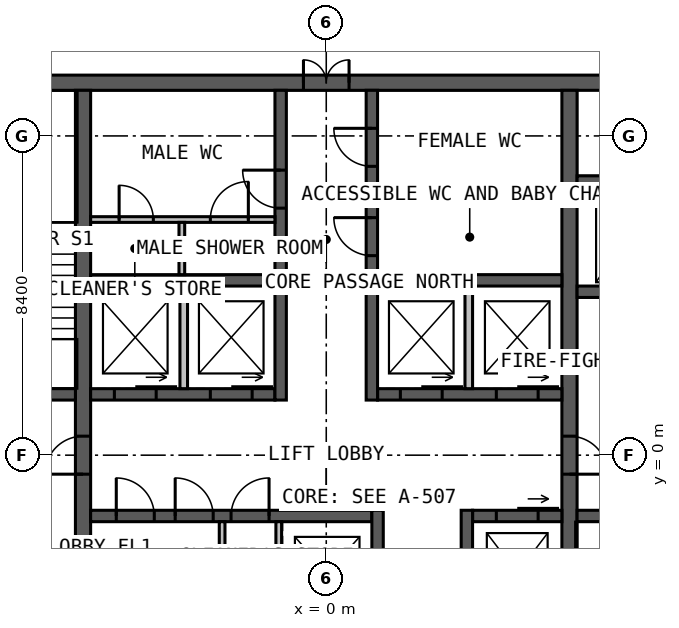
"""IFC4 building model, lengths in metres.
Left out: names, types, materials, properties, quantities, classifications, styles, units other than length and angle.
Written with IfcOpenShell. Run it as: python <this file> out.ifc"""

import sys

from ifc_helpers import new_model, si_unit, direction, frame, frame_2d, origin, place, context, subcontext, project, spatial, rectangle, extrude, element, fill, save


model = new_model("IFC4")
c1 = context("Model", 3, precision=1e-05, world=origin(), true_north=direction((0.0, 1.0)))
c2 = subcontext(c1, "Body", "Model", "MODEL_VIEW")
j1 = project(units=[si_unit("LENGTHUNIT", "METRE"), si_unit("PLANEANGLEUNIT", "RADIAN")], contexts=[c1])
p1 = place(None, origin())
s1 = spatial("IfcSite", under=j1, at=p1, CompositionType="ELEMENT")
p2 = place(p1, origin())
s2 = spatial("IfcBuilding", under=s1, at=p2, CompositionType="ELEMENT")
p3 = place(p2, frame((0.0, 0.0, 264.0)))
s3 = spatial("IfcBuildingStorey", under=s2, at=p3, CompositionType="ELEMENT", Elevation=264.0)
p4 = place(p3, frame((-10.0, 9.8, 0.0), z_axis=(0.0, 0.0, 1.0), x_axis=(1.0, 0.0, 0.0)))
e1 = element("IfcWall", 1, at=p4, inside=s3, PredefinedType="SOLIDWALL", context=c2, shape_type="SweptSolid", body=[
    extrude(rectangle(XDim=20.0, YDim=0.4, at=frame_2d((10.0, 0.0))), origin(), (0.0, 0.0, 1.0), 4.0),
])
p5 = place(p4, frame((9.4, 0.0, 0.0)))
e2 = element("IfcOpeningElement", 2, at=p5, cuts=e1, PredefinedType="OPENING", context=c2, shape_type="SweptSolid", body=[
    extrude(rectangle(XDim=1.2, YDim=2.2, at=frame_2d((0.6, 1.1))), frame((0.0, 0.21, 0.0), z_axis=(0.0, -1.0, 0.0), x_axis=(1.0, 0.0, 0.0)), (0.0, 0.0, 1.0), 0.42),
])
p6 = place(p3, frame((-6.4, -9.6, 0.0), z_axis=(0.0, 0.0, 1.0), x_axis=(0.0, 1.0, 0.0)))
e3 = element("IfcWall", 3, at=p6, inside=s3, PredefinedType="SOLIDWALL", context=c2, shape_type="SweptSolid", body=[
    extrude(rectangle(XDim=19.2, YDim=0.4, at=frame_2d((9.6, 0.0))), origin(), (0.0, 0.0, 1.0), 4.0),
])
p7 = place(p6, frame((9.1, 0.0, 0.0)))
e4 = element("IfcOpeningElement", 4, at=p7, cuts=e3, PredefinedType="OPENING", context=c2, shape_type="SweptSolid", body=[
    extrude(rectangle(XDim=1.0, YDim=2.2, at=frame_2d((0.5, 1.1))), frame((0.0, 0.21, 0.0), z_axis=(0.0, -1.0, 0.0), x_axis=(1.0, 0.0, 0.0)), (0.0, 0.0, 1.0), 0.42),
])
p8 = place(p3, frame((6.4, 9.6, 0.0), z_axis=(0.0, 0.0, 1.0), x_axis=(0.0, -1.0, 0.0)))
e5 = element("IfcWall", 5, at=p8, inside=s3, PredefinedType="SOLIDWALL", context=c2, shape_type="SweptSolid", body=[
    extrude(rectangle(XDim=19.2, YDim=0.4, at=frame_2d((9.6, 0.0))), origin(), (0.0, 0.0, 1.0), 4.0),
])
p9 = place(p8, frame((9.1, 0.0, 0.0)))
e6 = element("IfcOpeningElement", 6, at=p9, cuts=e5, PredefinedType="OPENING", context=c2, shape_type="SweptSolid", body=[
    extrude(rectangle(XDim=1.0, YDim=2.2, at=frame_2d((0.5, 1.1))), frame((0.0, 0.21, 0.0), z_axis=(0.0, -1.0, 0.0), x_axis=(1.0, 0.0, 0.0)), (0.0, 0.0, 1.0), 0.42),
])
p10 = place(p3, frame((-6.2, 1.6, 0.0), z_axis=(0.0, 0.0, 1.0), x_axis=(1.0, 0.0, 0.0)))
e7 = element("IfcWall", 7, at=p10, inside=s3, PredefinedType="SOLIDWALL", context=c2, shape_type="SweptSolid", body=[
    extrude(rectangle(XDim=4.85, YDim=0.3, at=frame_2d((2.425, 0.0))), origin(), (0.0, 0.0, 1.0), 4.0),
])
p11 = place(p10, frame((0.625, 0.0, 0.0)))
e8 = element("IfcOpeningElement", 8, at=p11, cuts=e7, PredefinedType="OPENING", context=c2, shape_type="SweptSolid", body=[
    extrude(rectangle(XDim=1.1, YDim=2.2, at=frame_2d((0.55, 1.1))), frame((0.0, 0.16, 0.0), z_axis=(0.0, -1.0, 0.0), x_axis=(1.0, 0.0, 0.0)), (0.0, 0.0, 1.0), 0.32),
])
p12 = place(p10, frame((3.15, 0.0, 0.0)))
e9 = element("IfcOpeningElement", 9, at=p12, cuts=e7, PredefinedType="OPENING", context=c2, shape_type="SweptSolid", body=[
    extrude(rectangle(XDim=1.1, YDim=2.2, at=frame_2d((0.55, 1.1))), frame((0.0, 0.16, 0.0), z_axis=(0.0, -1.0, 0.0), x_axis=(1.0, 0.0, 0.0)), (0.0, 0.0, 1.0), 0.32),
])
p13 = place(p3, frame((1.35, 1.6, 0.0), z_axis=(0.0, 0.0, 1.0), x_axis=(1.0, 0.0, 0.0)))
e10 = element("IfcWall", 10, at=p13, inside=s3, PredefinedType="SOLIDWALL", context=c2, shape_type="SweptSolid", body=[
    extrude(rectangle(XDim=4.85, YDim=0.3, at=frame_2d((2.425, 0.0))), origin(), (0.0, 0.0, 1.0), 4.0),
])
p14 = place(p13, frame((0.6, 0.0, 0.0)))
e11 = element("IfcOpeningElement", 11, at=p14, cuts=e10, PredefinedType="OPENING", context=c2, shape_type="SweptSolid", body=[
    extrude(rectangle(XDim=1.1, YDim=2.2, at=frame_2d((0.55, 1.1))), frame((0.0, 0.16, 0.0), z_axis=(0.0, -1.0, 0.0), x_axis=(1.0, 0.0, 0.0)), (0.0, 0.0, 1.0), 0.32),
])
p15 = place(p13, frame((3.125, 0.0, 0.0)))
e12 = element("IfcOpeningElement", 12, at=p15, cuts=e10, PredefinedType="OPENING", context=c2, shape_type="SweptSolid", body=[
    extrude(rectangle(XDim=1.1, YDim=2.2, at=frame_2d((0.55, 1.1))), frame((0.0, 0.16, 0.0), z_axis=(0.0, -1.0, 0.0), x_axis=(1.0, 0.0, 0.0)), (0.0, 0.0, 1.0), 0.32),
])
for number, where, z_axis, x_axis in (
    (13, (-6.2, 4.6, 0.0), (0.0, 0.0, 1.0), (1.0, 0.0, 0.0)),
    (14, (1.35, 4.6, 0.0), (0.0, 0.0, 1.0), (1.0, 0.0, 0.0)),
):
    element("IfcWall", number, at=place(p3, frame(where, z_axis=z_axis, x_axis=x_axis)), inside=s3, PredefinedType="SOLIDWALL", context=c2, shape_type="SweptSolid", body=[
        extrude(rectangle(XDim=4.85, YDim=0.3, at=frame_2d((2.425, 0.0))), origin(), (0.0, 0.0, 1.0), 4.0),
    ])
p16 = place(p3, frame((-1.2, 1.45, 0.0), z_axis=(0.0, 0.0, 1.0), x_axis=(0.0, 1.0, 0.0)))
e15 = element("IfcWall", 15, at=p16, inside=s3, PredefinedType="SOLIDWALL", context=c2, shape_type="SweptSolid", body=[
    extrude(rectangle(XDim=8.15, YDim=0.3, at=frame_2d((4.075, 0.0))), origin(), (0.0, 0.0, 1.0), 4.0),
])
p17 = place(p16, frame((5.05, 0.0, 0.0)))
e16 = element("IfcOpeningElement", 16, at=p17, cuts=e15, PredefinedType="OPENING", context=c2, shape_type="SweptSolid", body=[
    extrude(rectangle(XDim=1.0, YDim=2.2, at=frame_2d((0.5, 1.1))), frame((0.0, 0.16, 0.0), z_axis=(0.0, -1.0, 0.0), x_axis=(1.0, 0.0, 0.0)), (0.0, 0.0, 1.0), 0.32),
])
p18 = place(p3, frame((1.2, 1.45, 0.0), z_axis=(0.0, 0.0, 1.0), x_axis=(0.0, 1.0, 0.0)))
e17 = element("IfcWall", 17, at=p18, inside=s3, PredefinedType="SOLIDWALL", context=c2, shape_type="SweptSolid", body=[
    extrude(rectangle(XDim=8.15, YDim=0.3, at=frame_2d((4.075, 0.0))), origin(), (0.0, 0.0, 1.0), 4.0),
])
p19 = place(p18, frame((3.8, 0.0, 0.0)))
e18 = element("IfcOpeningElement", 18, at=p19, cuts=e17, PredefinedType="OPENING", context=c2, shape_type="SweptSolid", body=[
    extrude(rectangle(XDim=1.0, YDim=2.2, at=frame_2d((0.5, 1.1))), frame((0.0, 0.16, 0.0), z_axis=(0.0, -1.0, 0.0), x_axis=(1.0, 0.0, 0.0)), (0.0, 0.0, 1.0), 0.32),
])
p20 = place(p18, frame((6.15, 0.0, 0.0)))
e19 = element("IfcOpeningElement", 19, at=p20, cuts=e17, PredefinedType="OPENING", context=c2, shape_type="SweptSolid", body=[
    extrude(rectangle(XDim=1.0, YDim=2.2, at=frame_2d((0.5, 1.1))), frame((0.0, 0.16, 0.0), z_axis=(0.0, -1.0, 0.0), x_axis=(1.0, 0.0, 0.0)), (0.0, 0.0, 1.0), 0.32),
])
p21 = place(p3, frame((-6.2, -1.6, 0.0), z_axis=(0.0, 0.0, 1.0), x_axis=(1.0, 0.0, 0.0)))
e20 = element("IfcWall", 20, at=p21, inside=s3, PredefinedType="SOLIDWALL", context=c2, shape_type="SweptSolid", body=[
    extrude(rectangle(XDim=7.4, YDim=0.3, at=frame_2d((3.7, 0.0))), origin(), (0.0, 0.0, 1.0), 4.0),
])
p22 = place(p21, frame((0.675, 0.0, 0.0)))
e21 = element("IfcOpeningElement", 21, at=p22, cuts=e20, PredefinedType="OPENING", context=c2, shape_type="SweptSolid", body=[
    extrude(rectangle(XDim=1.0, YDim=2.2, at=frame_2d((0.5, 1.1))), frame((0.0, 0.16, 0.0), z_axis=(0.0, -1.0, 0.0), x_axis=(1.0, 0.0, 0.0)), (0.0, 0.0, 1.0), 0.32),
])
p23 = place(p21, frame((2.225, 0.0, 0.0)))
e22 = element("IfcOpeningElement", 22, at=p23, cuts=e20, PredefinedType="OPENING", context=c2, shape_type="SweptSolid", body=[
    extrude(rectangle(XDim=1.0, YDim=2.2, at=frame_2d((0.5, 1.1))), frame((0.0, 0.16, 0.0), z_axis=(0.0, -1.0, 0.0), x_axis=(1.0, 0.0, 0.0)), (0.0, 0.0, 1.0), 0.32),
])
p24 = place(p21, frame((3.695, 0.0, 0.0)))
e23 = element("IfcOpeningElement", 23, at=p24, cuts=e20, PredefinedType="OPENING", context=c2, shape_type="SweptSolid", body=[
    extrude(rectangle(XDim=1.0, YDim=2.2, at=frame_2d((0.5, 1.1))), frame((0.0, 0.16, 0.0), z_axis=(0.0, -1.0, 0.0), x_axis=(1.0, 0.0, 0.0)), (0.0, 0.0, 1.0), 0.32),
])
p25 = place(p3, frame((3.85, -1.6, 0.0), z_axis=(0.0, 0.0, 1.0), x_axis=(1.0, 0.0, 0.0)))
e24 = element("IfcWall", 24, at=p25, inside=s3, PredefinedType="SOLIDWALL", context=c2, shape_type="SweptSolid", body=[
    extrude(rectangle(XDim=2.35, YDim=0.3, at=frame_2d((1.175, 0.0))), origin(), (0.0, 0.0, 1.0), 4.0),
])
p26 = place(p25, frame((0.625, 0.0, 0.0)))
e25 = element("IfcOpeningElement", 25, at=p26, cuts=e24, PredefinedType="OPENING", context=c2, shape_type="SweptSolid", body=[
    extrude(rectangle(XDim=1.1, YDim=2.2, at=frame_2d((0.55, 1.1))), frame((0.0, 0.16, 0.0), z_axis=(0.0, -1.0, 0.0), x_axis=(1.0, 0.0, 0.0)), (0.0, 0.0, 1.0), 0.32),
])
p27 = place(p3, frame((1.35, -1.45, 0.0), z_axis=(0.0, 0.0, 1.0), x_axis=(0.0, -1.0, 0.0)))
e26 = element("IfcWall", 26, at=p27, inside=s3, PredefinedType="SOLIDWALL", context=c2, shape_type="SweptSolid", body=[
    extrude(rectangle(XDim=8.15, YDim=0.3, at=frame_2d((4.075, 0.0))), origin(), (0.0, 0.0, 1.0), 4.0),
])
p28 = place(p27, frame((6.0, 0.0, 0.0)))
e27 = element("IfcOpeningElement", 27, at=p28, cuts=e26, PredefinedType="OPENING", context=c2, shape_type="SweptSolid", body=[
    extrude(rectangle(XDim=1.0, YDim=2.2, at=frame_2d((0.5, 1.1))), frame((0.0, 0.16, 0.0), z_axis=(0.0, -1.0, 0.0), x_axis=(1.0, 0.0, 0.0)), (0.0, 0.0, 1.0), 0.32),
])
p29 = place(p27, frame((3.525, 0.0, 0.0)))
e28 = element("IfcOpeningElement", 28, at=p29, cuts=e26, PredefinedType="OPENING", context=c2, shape_type="SweptSolid", body=[
    extrude(rectangle(XDim=0.9, YDim=2.2, at=frame_2d((0.45, 1.1))), frame((0.0, 0.16, 0.0), z_axis=(0.0, -1.0, 0.0), x_axis=(1.0, 0.0, 0.0)), (0.0, 0.0, 1.0), 0.32),
])
p30 = place(p3, frame((3.7, -1.45, 0.0), z_axis=(0.0, 0.0, 1.0), x_axis=(0.0, -1.0, 0.0)))
e29 = element("IfcWall", 29, at=p30, inside=s3, PredefinedType="SOLIDWALL", context=c2, shape_type="SweptSolid", body=[
    extrude(rectangle(XDim=8.15, YDim=0.3, at=frame_2d((4.075, 0.0))), origin(), (0.0, 0.0, 1.0), 4.0),
])
p31 = place(p30, frame((5.1, 0.0, 0.0)))
e30 = element("IfcOpeningElement", 30, at=p31, cuts=e29, PredefinedType="OPENING", context=c2, shape_type="SweptSolid", body=[
    extrude(rectangle(XDim=0.9, YDim=2.2, at=frame_2d((0.45, 1.1))), frame((0.0, 0.16, 0.0), z_axis=(0.0, -1.0, 0.0), x_axis=(1.0, 0.0, 0.0)), (0.0, 0.0, 1.0), 0.32),
])
p32 = place(p3, frame((-9.6, 1.6, 0.0), z_axis=(0.0, 0.0, 1.0), x_axis=(1.0, 0.0, 0.0)))
e31 = element("IfcWall", 31, at=p32, inside=s3, PredefinedType="SOLIDWALL", context=c2, shape_type="SweptSolid", body=[
    extrude(rectangle(XDim=3.0, YDim=0.3, at=frame_2d((1.5, 0.0))), origin(), (0.0, 0.0, 1.0), 4.0),
])
p33 = place(p32, frame((1.0, 0.0, 0.0)))
e32 = element("IfcOpeningElement", 32, at=p33, cuts=e31, PredefinedType="OPENING", context=c2, shape_type="SweptSolid", body=[
    extrude(rectangle(XDim=1.0, YDim=2.2, at=frame_2d((0.5, 1.1))), frame((0.0, 0.16, 0.0), z_axis=(0.0, -1.0, 0.0), x_axis=(1.0, 0.0, 0.0)), (0.0, 0.0, 1.0), 0.32),
])
p34 = place(p3, frame((6.6, -1.6, 0.0), z_axis=(0.0, 0.0, 1.0), x_axis=(1.0, 0.0, 0.0)))
e33 = element("IfcWall", 33, at=p34, inside=s3, PredefinedType="SOLIDWALL", context=c2, shape_type="SweptSolid", body=[
    extrude(rectangle(XDim=3.0, YDim=0.3, at=frame_2d((1.5, 0.0))), origin(), (0.0, 0.0, 1.0), 4.0),
])
p35 = place(p34, frame((1.0, 0.0, 0.0)))
e34 = element("IfcOpeningElement", 34, at=p35, cuts=e33, PredefinedType="OPENING", context=c2, shape_type="SweptSolid", body=[
    extrude(rectangle(XDim=1.0, YDim=2.2, at=frame_2d((0.5, 1.1))), frame((0.0, 0.16, 0.0), z_axis=(0.0, -1.0, 0.0), x_axis=(1.0, 0.0, 0.0)), (0.0, 0.0, 1.0), 0.32),
])
p36 = place(p3, frame((6.6, 4.3, 0.0), z_axis=(0.0, 0.0, 1.0), x_axis=(1.0, 0.0, 0.0)))
e35 = element("IfcWall", 35, at=p36, inside=s3, PredefinedType="SOLIDWALL", context=c2, shape_type="SweptSolid", body=[
    extrude(rectangle(XDim=3.0, YDim=0.3, at=frame_2d((1.5, 0.0))), origin(), (0.0, 0.0, 1.0), 4.0),
])
p37 = place(p36, frame((0.75, 0.0, 0.0)))
e36 = element("IfcOpeningElement", 36, at=p37, cuts=e35, PredefinedType="OPENING", context=c2, shape_type="SweptSolid", body=[
    extrude(rectangle(XDim=1.1, YDim=2.2, at=frame_2d((0.55, 1.1))), frame((0.0, 0.16, 0.0), z_axis=(0.0, -1.0, 0.0), x_axis=(1.0, 0.0, 0.0)), (0.0, 0.0, 1.0), 0.32),
])
p38 = place(p3, frame((6.6, 7.2, 0.0), z_axis=(0.0, 0.0, 1.0), x_axis=(1.0, 0.0, 0.0)))
e37 = element("IfcWall", 37, at=p38, inside=s3, PredefinedType="SOLIDWALL", context=c2, shape_type="SweptSolid", body=[
    extrude(rectangle(XDim=3.0, YDim=0.3, at=frame_2d((1.5, 0.0))), origin(), (0.0, 0.0, 1.0), 4.0),
])
for number, where, z_axis, x_axis in (
    (38, (-3.75, 1.75, 0.0), (0.0, 0.0, 1.0), (0.0, 1.0, 0.0)),
    (39, (3.75, 1.75, 0.0), (0.0, 0.0, 1.0), (0.0, 1.0, 0.0)),
):
    element("IfcWall", number, at=place(p3, frame(where, z_axis=z_axis, x_axis=x_axis)), inside=s3, PredefinedType="SOLIDWALL", context=c2, shape_type="SweptSolid", body=[
        extrude(rectangle(XDim=2.7, YDim=0.2, at=frame_2d((1.35, 0.0))), origin(), (0.0, 0.0, 1.0), 3.75),
    ])
p39 = place(p3, frame((1.35, 6.8, 0.0), z_axis=(0.0, 0.0, 1.0), x_axis=(1.0, 0.0, 0.0)))
e40 = element("IfcWall", 40, at=p39, inside=s3, PredefinedType="PARTITIONING", context=c2, shape_type="SweptSolid", body=[
    extrude(rectangle(XDim=4.85, YDim=0.15, at=frame_2d((2.425, 0.0))), origin(), (0.0, 0.0, 1.0), 3.75),
])
p40 = place(p3, frame((-6.2, 6.2, 0.0), z_axis=(0.0, 0.0, 1.0), x_axis=(1.0, 0.0, 0.0)))
e41 = element("IfcWall", 41, at=p40, inside=s3, PredefinedType="PARTITIONING", context=c2, shape_type="SweptSolid", body=[
    extrude(rectangle(XDim=4.85, YDim=0.15, at=frame_2d((2.425, 0.0))), origin(), (0.0, 0.0, 1.0), 3.75),
])
p41 = place(p40, frame((3.15, 0.0, 0.0)))
e42 = element("IfcOpeningElement", 42, at=p41, cuts=e41, PredefinedType="OPENING", context=c2, shape_type="SweptSolid", body=[
    extrude(rectangle(XDim=1.0, YDim=2.2, at=frame_2d((0.5, 1.1))), frame((0.0, 0.085, 0.0), z_axis=(0.0, -1.0, 0.0), x_axis=(1.0, 0.0, 0.0)), (0.0, 0.0, 1.0), 0.17),
])
p42 = place(p40, frame((0.75, 0.0, 0.0)))
e43 = element("IfcOpeningElement", 43, at=p42, cuts=e41, PredefinedType="OPENING", context=c2, shape_type="SweptSolid", body=[
    extrude(rectangle(XDim=0.9, YDim=2.2, at=frame_2d((0.45, 1.1))), frame((0.0, 0.085, 0.0), z_axis=(0.0, -1.0, 0.0), x_axis=(1.0, 0.0, 0.0)), (0.0, 0.0, 1.0), 0.17),
])
p43 = place(p3, frame((-3.8, 4.75, 0.0), z_axis=(0.0, 0.0, 1.0), x_axis=(0.0, 1.0, 0.0)))
e44 = element("IfcWall", 44, at=p43, inside=s3, PredefinedType="PARTITIONING", context=c2, shape_type="SweptSolid", body=[
    extrude(rectangle(XDim=1.375, YDim=0.15, at=frame_2d((0.688, 0.0))), origin(), (0.0, 0.0, 1.0), 3.75),
])
for number, where, z_axis, x_axis in (
    (45, (-2.74, -1.75, 0.0), (0.0, 0.0, 1.0), (0.0, -1.0, 0.0)),
    (46, (-1.25, -1.75, 0.0), (0.0, 0.0, 1.0), (0.0, -1.0, 0.0)),
):
    element("IfcWall", number, at=place(p3, frame(where, z_axis=z_axis, x_axis=x_axis)), inside=s3, PredefinedType="PARTITIONING", context=c2, shape_type="SweptSolid", body=[
        extrude(rectangle(XDim=2.7, YDim=0.15, at=frame_2d((1.35, 0.0))), origin(), (0.0, 0.0, 1.0), 3.75),
    ])
p44 = place(p5, origin())
e47 = element("IfcDoor", 47, at=p44, inside=s3, OperationType="DOUBLE_DOOR_SINGLE_SWING", PredefinedType="DOOR", context=c2, shape_type="SweptSolid", body=[
    extrude(rectangle(XDim=1.2, YDim=2.2, at=frame_2d((0.6, 1.1))), frame((0.0, 0.025, 0.0), z_axis=(0.0, -1.0, 0.0), x_axis=(1.0, 0.0, 0.0)), (0.0, 0.0, 1.0), 0.05),
])
fill(e2, e47)
p45 = place(p7, origin())
e48 = element("IfcDoor", 48, at=p45, inside=s3, OperationType="SINGLE_SWING_LEFT", PredefinedType="DOOR", context=c2, shape_type="SweptSolid", body=[
    extrude(rectangle(XDim=1.0, YDim=2.2, at=frame_2d((0.5, 1.1))), frame((0.0, 0.025, 0.0), z_axis=(0.0, -1.0, 0.0), x_axis=(1.0, 0.0, 0.0)), (0.0, 0.0, 1.0), 0.05),
])
fill(e4, e48)
p46 = place(p9, origin())
e49 = element("IfcDoor", 49, at=p46, inside=s3, OperationType="SINGLE_SWING_RIGHT", PredefinedType="DOOR", context=c2, shape_type="SweptSolid", body=[
    extrude(rectangle(XDim=1.0, YDim=2.2, at=frame_2d((0.5, 1.1))), frame((0.0, 0.025, 0.0), z_axis=(0.0, -1.0, 0.0), x_axis=(1.0, 0.0, 0.0)), (0.0, 0.0, 1.0), 0.05),
])
fill(e6, e49)
p47 = place(p17, origin())
e50 = element("IfcDoor", 50, at=p47, inside=s3, OperationType="SINGLE_SWING_RIGHT", PredefinedType="DOOR", context=c2, shape_type="SweptSolid", body=[
    extrude(rectangle(XDim=1.0, YDim=2.2, at=frame_2d((0.5, 1.1))), frame((0.0, 0.025, 0.0), z_axis=(0.0, -1.0, 0.0), x_axis=(1.0, 0.0, 0.0)), (0.0, 0.0, 1.0), 0.05),
])
fill(e16, e50)
p48 = place(p19, origin())
e51 = element("IfcDoor", 51, at=p48, inside=s3, OperationType="SINGLE_SWING_RIGHT", PredefinedType="DOOR", context=c2, shape_type="SweptSolid", body=[
    extrude(rectangle(XDim=1.0, YDim=2.2, at=frame_2d((0.5, 1.1))), frame((0.0, 0.025, 0.0), z_axis=(0.0, -1.0, 0.0), x_axis=(1.0, 0.0, 0.0)), (0.0, 0.0, 1.0), 0.05),
])
fill(e18, e51)
p49 = place(p20, origin())
e52 = element("IfcDoor", 52, at=p49, inside=s3, OperationType="SINGLE_SWING_RIGHT", PredefinedType="DOOR", context=c2, shape_type="SweptSolid", body=[
    extrude(rectangle(XDim=1.0, YDim=2.2, at=frame_2d((0.5, 1.1))), frame((0.0, 0.025, 0.0), z_axis=(0.0, -1.0, 0.0), x_axis=(1.0, 0.0, 0.0)), (0.0, 0.0, 1.0), 0.05),
])
fill(e19, e52)
p50 = place(p41, origin())
e53 = element("IfcDoor", 53, at=p50, inside=s3, OperationType="SINGLE_SWING_RIGHT", PredefinedType="DOOR", context=c2, shape_type="SweptSolid", body=[
    extrude(rectangle(XDim=1.0, YDim=2.2, at=frame_2d((0.5, 1.1))), frame((0.0, 0.025, 0.0), z_axis=(0.0, -1.0, 0.0), x_axis=(1.0, 0.0, 0.0)), (0.0, 0.0, 1.0), 0.05),
])
fill(e42, e53)
p51 = place(p42, origin())
e54 = element("IfcDoor", 54, at=p51, inside=s3, OperationType="SINGLE_SWING_LEFT", PredefinedType="DOOR", context=c2, shape_type="SweptSolid", body=[
    extrude(rectangle(XDim=0.9, YDim=2.2, at=frame_2d((0.45, 1.1))), frame((0.0, 0.025, 0.0), z_axis=(0.0, -1.0, 0.0), x_axis=(1.0, 0.0, 0.0)), (0.0, 0.0, 1.0), 0.05),
])
fill(e43, e54)
p52 = place(p22, origin())
e55 = element("IfcDoor", 55, at=p52, inside=s3, OperationType="SINGLE_SWING_LEFT", PredefinedType="DOOR", context=c2, shape_type="SweptSolid", body=[
    extrude(rectangle(XDim=1.0, YDim=2.2, at=frame_2d((0.5, 1.1))), frame((0.0, 0.025, 0.0), z_axis=(0.0, -1.0, 0.0), x_axis=(1.0, 0.0, 0.0)), (0.0, 0.0, 1.0), 0.05),
])
fill(e21, e55)
p53 = place(p23, origin())
e56 = element("IfcDoor", 56, at=p53, inside=s3, OperationType="SINGLE_SWING_LEFT", PredefinedType="DOOR", context=c2, shape_type="SweptSolid", body=[
    extrude(rectangle(XDim=1.0, YDim=2.2, at=frame_2d((0.5, 1.1))), frame((0.0, 0.025, 0.0), z_axis=(0.0, -1.0, 0.0), x_axis=(1.0, 0.0, 0.0)), (0.0, 0.0, 1.0), 0.05),
])
fill(e22, e56)
p54 = place(p24, origin())
e57 = element("IfcDoor", 57, at=p54, inside=s3, OperationType="SINGLE_SWING_RIGHT", PredefinedType="DOOR", context=c2, shape_type="SweptSolid", body=[
    extrude(rectangle(XDim=1.0, YDim=2.2, at=frame_2d((0.5, 1.1))), frame((0.0, 0.025, 0.0), z_axis=(0.0, -1.0, 0.0), x_axis=(1.0, 0.0, 0.0)), (0.0, 0.0, 1.0), 0.05),
])
fill(e23, e57)
p55 = place(p11, origin())
e58 = element("IfcDoor", 58, at=p55, inside=s3, OperationType="SLIDING_TO_LEFT", PredefinedType="DOOR", context=c2, shape_type="SweptSolid", body=[
    extrude(rectangle(XDim=1.1, YDim=2.2, at=frame_2d((0.55, 1.1))), frame((0.0, 0.025, 0.0), z_axis=(0.0, -1.0, 0.0), x_axis=(1.0, 0.0, 0.0)), (0.0, 0.0, 1.0), 0.05),
])
fill(e8, e58)
p56 = place(p12, origin())
e59 = element("IfcDoor", 59, at=p56, inside=s3, OperationType="SLIDING_TO_LEFT", PredefinedType="DOOR", context=c2, shape_type="SweptSolid", body=[
    extrude(rectangle(XDim=1.1, YDim=2.2, at=frame_2d((0.55, 1.1))), frame((0.0, 0.025, 0.0), z_axis=(0.0, -1.0, 0.0), x_axis=(1.0, 0.0, 0.0)), (0.0, 0.0, 1.0), 0.05),
])
fill(e9, e59)
p57 = place(p14, origin())
e60 = element("IfcDoor", 60, at=p57, inside=s3, OperationType="SLIDING_TO_LEFT", PredefinedType="DOOR", context=c2, shape_type="SweptSolid", body=[
    extrude(rectangle(XDim=1.1, YDim=2.2, at=frame_2d((0.55, 1.1))), frame((0.0, 0.025, 0.0), z_axis=(0.0, -1.0, 0.0), x_axis=(1.0, 0.0, 0.0)), (0.0, 0.0, 1.0), 0.05),
])
fill(e11, e60)
p58 = place(p15, origin())
e61 = element("IfcDoor", 61, at=p58, inside=s3, OperationType="SLIDING_TO_LEFT", PredefinedType="DOOR", context=c2, shape_type="SweptSolid", body=[
    extrude(rectangle(XDim=1.1, YDim=2.2, at=frame_2d((0.55, 1.1))), frame((0.0, 0.025, 0.0), z_axis=(0.0, -1.0, 0.0), x_axis=(1.0, 0.0, 0.0)), (0.0, 0.0, 1.0), 0.05),
])
fill(e12, e61)
p59 = place(p26, origin())
e62 = element("IfcDoor", 62, at=p59, inside=s3, OperationType="SLIDING_TO_LEFT", PredefinedType="DOOR", context=c2, shape_type="SweptSolid", body=[
    extrude(rectangle(XDim=1.1, YDim=2.2, at=frame_2d((0.55, 1.1))), frame((0.0, 0.025, 0.0), z_axis=(0.0, -1.0, 0.0), x_axis=(1.0, 0.0, 0.0)), (0.0, 0.0, 1.0), 0.05),
])
fill(e25, e62)
save(model, sys.argv[1])
